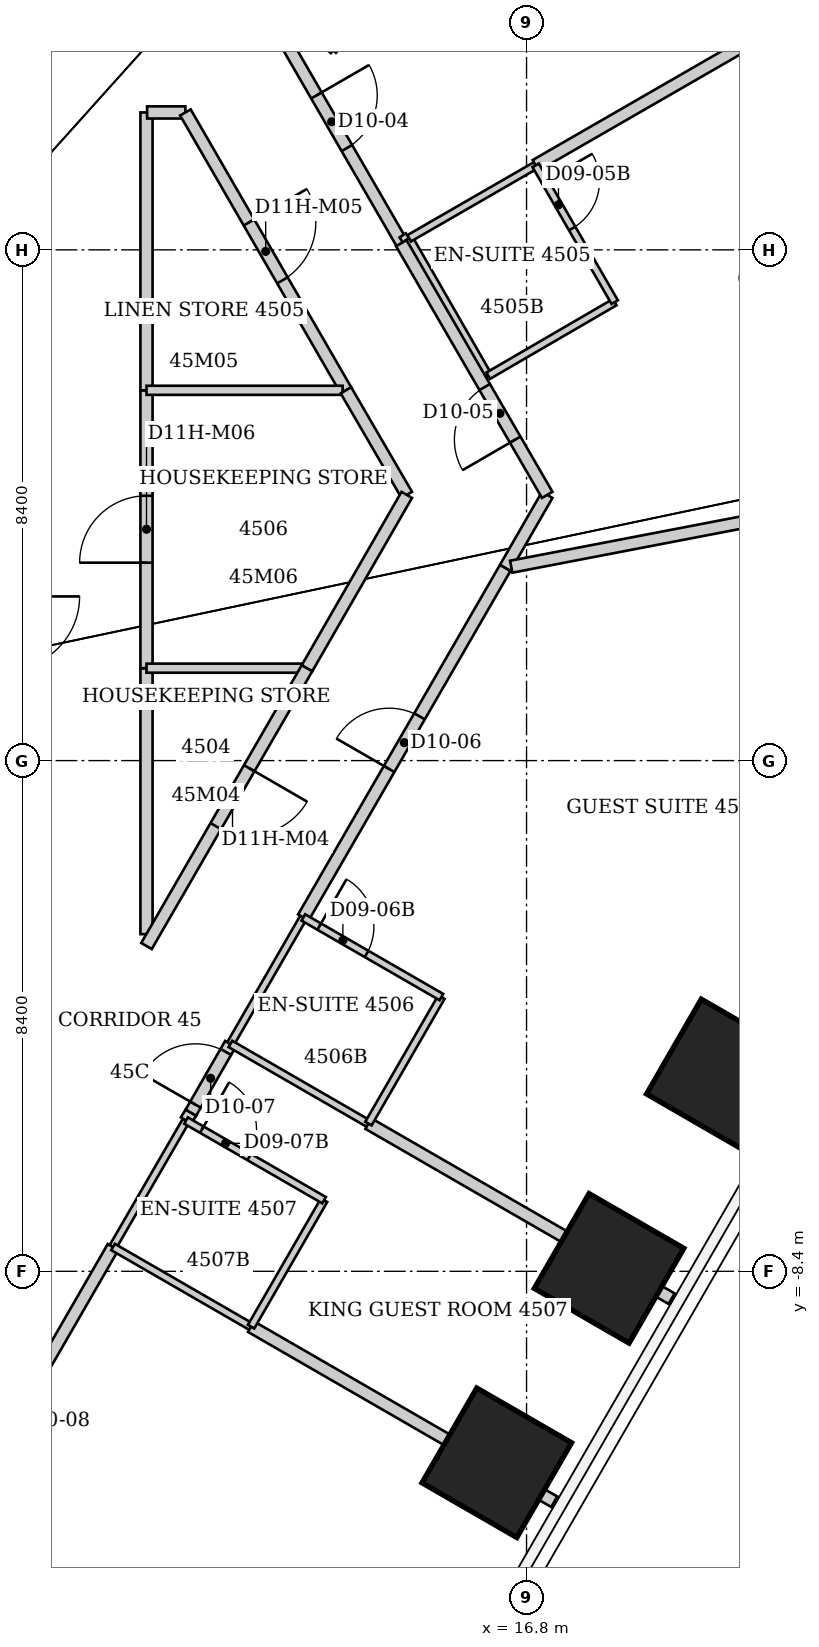
"""IFC4 building model, lengths in metres.
Left out: names, types, materials, properties, quantities, classifications, styles, units other than length and angle.
Written with IfcOpenShell. Run it as: python <this file> out.ifc"""

import sys

from ifc_helpers import new_model, si_unit, direction, frame, frame_2d, origin, origin_2d, place, context, subcontext, project, spatial, rectangle, extrude, element, fill, save


model = new_model("IFC4")
c1 = context("Model", 3, precision=1e-05, world=origin(), true_north=direction((0.0, 1.0)))
c2 = subcontext(c1, "Body", "Model", "MODEL_VIEW")
j1 = project(units=[si_unit("LENGTHUNIT", "METRE"), si_unit("PLANEANGLEUNIT", "RADIAN")], contexts=[c1])
p1 = place(None, origin())
s1 = spatial("IfcSite", under=j1, at=p1, CompositionType="ELEMENT")
p2 = place(p1, origin())
s2 = spatial("IfcBuilding", under=s1, at=p2, CompositionType="ELEMENT")
p3 = place(p2, frame((0.0, 0.0, 183.2)))
s3 = spatial("IfcBuildingStorey", under=s2, at=p3, CompositionType="ELEMENT", Elevation=183.2)
for number, where, z_axis, x_axis in (
    (1, (20.003, -5.153, 0.0), (0.0, 0.0, 1.0), (0.866, -0.5, 0.0)),
    (2, (18.157, -8.351, 0.0), (0.0, 0.0, 1.0), (0.866, -0.5, 0.0)),
    (3, (16.311, -11.549, 0.0), (0.0, 0.0, 1.0), (0.866, -0.5, 0.0)),
):
    element("IfcColumn", number, at=place(p3, frame(where, z_axis=z_axis, x_axis=x_axis)), inside=s3, PredefinedType="COLUMN", context=c2, shape_type="SweptSolid", body=[
        extrude(rectangle(XDim=1.8, YDim=1.8, at=origin_2d()), origin(), (0.0, 0.0, 1.0), 3.8),
    ])
p4 = place(p3, frame((6.7, -13.72, 0.0), z_axis=(0.0, 0.0, 1.0), x_axis=(0.499729921425, 0.866181277581, 0.0)))
e4 = element("IfcWall", 4, at=p4, inside=s3, PredefinedType="PARTITIONING", context=c2, shape_type="SweptSolid", body=[
    extrude(rectangle(XDim=6.604, YDim=0.2, at=frame_2d((3.302, 0.0))), origin(), (0.0, 0.0, 1.0), 3.64),
])
p5 = place(p4, frame((2.802, 0.0, 0.0)))
e5 = element("IfcOpeningElement", 5, at=p5, cuts=e4, PredefinedType="OPENING", context=c2, shape_type="SweptSolid", body=[
    extrude(rectangle(XDim=1.0, YDim=2.13, at=frame_2d((0.5, 1.065))), frame((0.0, 0.1, 0.0), z_axis=(0.0, -1.0, 0.0), x_axis=(1.0, 0.0, 0.0)), (0.0, 0.0, 1.0), 0.2),
])
p6 = place(p3, frame((9.996, -7.998, 0.0), z_axis=(0.0, 0.0, 1.0), x_axis=(0.501188543314, 0.865338109672, 0.0)))
e6 = element("IfcWall", 6, at=p6, inside=s3, PredefinedType="PARTITIONING", context=c2, shape_type="SweptSolid", body=[
    extrude(rectangle(XDim=2.402, YDim=0.12, at=frame_2d((1.201, 0.0))), origin(), (0.0, 0.0, 1.0), 3.64),
])
p7 = place(p3, frame((10.0, -8.0, 0.0), z_axis=(0.0, 0.0, 1.0), x_axis=(0.866010296064, -0.500026166427, 0.0)))
e7 = element("IfcWall", 7, at=p7, inside=s3, PredefinedType="PARTITIONING", context=c2, shape_type="SweptSolid", body=[
    extrude(rectangle(XDim=2.621, YDim=0.12, at=frame_2d((1.311, 0.0))), origin(), (0.0, 0.0, 1.0), 3.038),
])
p8 = place(p3, frame((10.55, -2.855, 0.0), z_axis=(0.0, 0.0, 1.0), x_axis=(0.0, 1.0, 0.0)))
e8 = element("IfcWall", 8, at=p8, inside=s3, PredefinedType="PARTITIONING", context=c2, shape_type="SweptSolid", body=[
    extrude(rectangle(XDim=4.375, YDim=0.2, at=frame_2d((2.188, 0.0))), origin(), (0.0, 0.0, 1.0), 3.64),
])
p9 = place(p3, frame((10.55, 1.52, 0.0), z_axis=(0.0, 0.0, 1.0), x_axis=(0.0, 1.0, 0.0)))
e9 = element("IfcWall", 9, at=p9, inside=s3, PredefinedType="PARTITIONING", context=c2, shape_type="SweptSolid", body=[
    extrude(rectangle(XDim=4.57, YDim=0.2, at=frame_2d((2.285, 0.0))), origin(), (0.0, 0.0, 1.0), 3.64),
])
p10 = place(p9, frame((1.735, 0.0, 0.0)))
e10 = element("IfcOpeningElement", 10, at=p10, cuts=e9, PredefinedType="OPENING", context=c2, shape_type="SweptSolid", body=[
    extrude(rectangle(XDim=1.1, YDim=2.2, at=frame_2d((0.55, 1.1))), frame((0.0, 0.1, 0.0), z_axis=(0.0, -1.0, 0.0), x_axis=(1.0, 0.0, 0.0)), (0.0, 0.0, 1.0), 0.2),
])
p11 = place(p3, frame((10.55, 1.52, 0.0), z_axis=(0.0, 0.0, 1.0), x_axis=(1.0, 0.0, 0.0)))
e11 = element("IfcWall", 11, at=p11, inside=s3, PredefinedType="PARTITIONING", context=c2, shape_type="SweptSolid", body=[
    extrude(rectangle(XDim=2.585, YDim=0.15, at=frame_2d((1.292, 0.0))), origin(), (0.0, 0.0, 1.0), 3.64),
])
p12 = place(p3, frame((10.55, 6.09, 0.0), z_axis=(0.0, 0.0, 1.0), x_axis=(0.0, 1.0, 0.0)))
e12 = element("IfcWall", 12, at=p12, inside=s3, PredefinedType="PARTITIONING", context=c2, shape_type="SweptSolid", body=[
    extrude(rectangle(XDim=4.57, YDim=0.2, at=frame_2d((2.285, 0.0))), origin(), (0.0, 0.0, 1.0), 3.64),
])
p13 = place(p3, frame((10.56, 10.66, 0.0), z_axis=(0.0, 0.0, 1.0), x_axis=(1.0, 0.0, 0.0)))
e13 = element("IfcWall", 13, at=p13, inside=s3, PredefinedType="PARTITIONING", context=c2, shape_type="SweptSolid", body=[
    extrude(rectangle(XDim=0.63, YDim=0.2, at=frame_2d((0.315, 0.0))), origin(), (0.0, 0.0, 1.0), 3.64),
])
p14 = place(p3, frame((11.19, 10.66, 0.0), z_axis=(0.0, 0.0, 1.0), x_axis=(0.500248310865, -0.865881993967, 0.0)))
e14 = element("IfcWall", 14, at=p14, inside=s3, PredefinedType="PARTITIONING", context=c2, shape_type="SweptSolid", body=[
    extrude(rectangle(XDim=5.278, YDim=0.2, at=frame_2d((2.639, 0.0))), origin(), (0.0, 0.0, 1.0), 3.64),
])
p15 = place(p14, frame((2.089, 0.0, 0.0)))
e15 = element("IfcOpeningElement", 15, at=p15, cuts=e14, PredefinedType="OPENING", context=c2, shape_type="SweptSolid", body=[
    extrude(rectangle(XDim=1.1, YDim=2.2, at=frame_2d((0.55, 1.1))), frame((0.0, 0.1, 0.0), z_axis=(0.0, -1.0, 0.0), x_axis=(1.0, 0.0, 0.0)), (0.0, 0.0, 1.0), 0.2),
])
p16 = place(p3, frame((11.2, -5.92, 0.0), z_axis=(0.0, 0.0, 1.0), x_axis=(0.524811420021, 0.851218522717, 0.0)))
e16 = element("IfcWall", 16, at=p16, inside=s3, PredefinedType="PARTITIONING", context=c2, shape_type="SweptSolid", body=[
    extrude(rectangle(XDim=0.153, YDim=0.2, at=frame_2d((0.076, 0.0))), origin(), (0.0, 0.0, 1.0), 3.64),
])
p17 = place(p3, frame((11.28, -5.79, 0.0), z_axis=(0.0, 0.0, 1.0), x_axis=(0.498516863914, 0.866880001149, 0.0)))
e17 = element("IfcWall", 17, at=p17, inside=s3, PredefinedType="PARTITIONING", context=c2, shape_type="SweptSolid", body=[
    extrude(rectangle(XDim=1.304, YDim=0.2, at=frame_2d((0.652, 0.0))), origin(), (0.0, 0.0, 1.0), 3.64),
])
p18 = place(p17, frame((0.152, 0.0, 0.0)))
e18 = element("IfcOpeningElement", 18, at=p18, cuts=e17, PredefinedType="OPENING", context=c2, shape_type="SweptSolid", body=[
    extrude(rectangle(XDim=1.0, YDim=2.13, at=frame_2d((0.5, 1.065))), frame((0.0, 0.1, 0.0), z_axis=(0.0, -1.0, 0.0), x_axis=(1.0, 0.0, 0.0)), (0.0, 0.0, 1.0), 0.2),
])
p19 = place(p3, frame((11.62, 13.42, 0.0), z_axis=(0.0, 0.0, 1.0), x_axis=(0.754444902764, -0.656363381591, 0.0)))
e19 = element("IfcWall", 19, at=p19, inside=s3, PredefinedType="PARTITIONING", context=c2, shape_type="SweptSolid", body=[
    extrude(rectangle(XDim=2.651, YDim=0.12, at=frame_2d((1.325, 0.0))), origin(), (0.0, 0.0, 1.0), 3.64),
])
p20 = place(p3, frame((11.93, -4.66, 0.0), z_axis=(0.0, 0.0, 1.0), x_axis=(0.499737123639, 0.866177122335, 0.0)))
e20 = element("IfcWall", 20, at=p20, inside=s3, PredefinedType="PARTITIONING", context=c2, shape_type="SweptSolid", body=[
    extrude(rectangle(XDim=2.401, YDim=0.12, at=frame_2d((1.201, 0.0))), origin(), (0.0, 0.0, 1.0), 3.64),
])
p21 = place(p3, frame((11.93, -4.66, 0.0), z_axis=(0.0, 0.0, 1.0), x_axis=(0.865969958829, -0.500096021185, 0.0)))
e21 = element("IfcWall", 21, at=p21, inside=s3, PredefinedType="PARTITIONING", context=c2, shape_type="SweptSolid", body=[
    extrude(rectangle(XDim=2.621, YDim=0.12, at=frame_2d((1.311, 0.0))), origin(), (0.0, 0.0, 1.0), 3.038),
])
p22 = place(p3, frame((12.27, -9.311, 0.0), z_axis=(0.0, 0.0, 1.0), x_axis=(0.865985044037, -0.500069898618, 0.0)))
e22 = element("IfcWall", 22, at=p22, inside=s3, PredefinedType="PARTITIONING", context=c2, shape_type="SweptSolid", body=[
    extrude(rectangle(XDim=5.758, YDim=0.2, at=frame_2d((2.879, 0.0))), origin(), (0.0, 0.0, 1.0), 3.038),
])
p23 = place(p3, frame((12.27, -9.31, 0.0), z_axis=(0.0, 0.0, 1.0), x_axis=(0.499693115345, 0.866202511239, 0.0)))
e23 = element("IfcWall", 23, at=p23, inside=s3, PredefinedType="PARTITIONING", context=c2, shape_type="SweptSolid", body=[
    extrude(rectangle(XDim=2.401, YDim=0.12, at=frame_2d((1.201, 0.0))), origin(), (0.0, 0.0, 1.0), 3.64),
])
p24 = place(p3, frame((12.44, 12.504, 0.0), z_axis=(0.0, 0.0, 1.0), x_axis=(0.500616963614, -0.865668906535, 0.0)))
e24 = element("IfcWall", 24, at=p24, inside=s3, PredefinedType="PARTITIONING", context=c2, shape_type="SweptSolid", body=[
    extrude(rectangle(XDim=4.614, YDim=0.2, at=frame_2d((2.307, 0.0))), origin(), (0.0, 0.0, 1.0), 3.64),
])
p25 = place(p24, frame((1.807, 0.0, 0.0)))
e25 = element("IfcOpeningElement", 25, at=p25, cuts=e24, PredefinedType="OPENING", context=c2, shape_type="SweptSolid", body=[
    extrude(rectangle(XDim=1.0, YDim=2.13, at=frame_2d((0.5, 1.065))), frame((0.0, 0.1, 0.0), z_axis=(0.0, -1.0, 0.0), x_axis=(1.0, 0.0, 0.0)), (0.0, 0.0, 1.0), 0.2),
])
p26 = place(p3, frame((13.13, -2.58, 0.0), z_axis=(0.0, 0.0, 1.0), x_axis=(0.500034373799, 0.866005557153, 0.0)))
e26 = element("IfcWall", 26, at=p26, inside=s3, PredefinedType="PARTITIONING", context=c2, shape_type="SweptSolid", body=[
    extrude(rectangle(XDim=6.64, YDim=0.2, at=frame_2d((3.32, 0.0))), origin(), (0.0, 0.0, 1.0), 3.64),
])
p27 = place(p26, frame((2.82, 0.0, 0.0)))
e27 = element("IfcOpeningElement", 27, at=p27, cuts=e26, PredefinedType="OPENING", context=c2, shape_type="SweptSolid", body=[
    extrude(rectangle(XDim=1.0, YDim=2.13, at=frame_2d((0.5, 1.065))), frame((0.0, 0.1, 0.0), z_axis=(0.0, -1.0, 0.0), x_axis=(1.0, 0.0, 0.0)), (0.0, 0.0, 1.0), 0.2),
])
p28 = place(p3, frame((13.19, 1.52, 0.0), z_axis=(0.0, 0.0, 1.0), x_axis=(-0.500193590286, -0.865913605527, 0.0)))
e28 = element("IfcWall", 28, at=p28, inside=s3, PredefinedType="PARTITIONING", context=c2, shape_type="SweptSolid", body=[
    extrude(rectangle(XDim=5.278, YDim=0.2, at=frame_2d((2.639, 0.0))), origin(), (0.0, 0.0, 1.0), 3.64),
])
p29 = place(p28, frame((1.9, 0.0, 0.0)))
e29 = element("IfcOpeningElement", 29, at=p29, cuts=e28, PredefinedType="OPENING", context=c2, shape_type="SweptSolid", body=[
    extrude(rectangle(XDim=1.1, YDim=2.2, at=frame_2d((0.55, 1.1))), frame((0.0, 0.1, 0.0), z_axis=(0.0, -1.0, 0.0), x_axis=(1.0, 0.0, 0.0)), (0.0, 0.0, 1.0), 0.2),
])
p30 = place(p3, frame((13.47, -7.23, 0.0), z_axis=(0.0, 0.0, 1.0), x_axis=(-0.866114241029, 0.499846097802, 0.0)))
e30 = element("IfcWall", 30, at=p30, inside=s3, PredefinedType="PARTITIONING", context=c2, shape_type="SweptSolid", body=[
    extrude(rectangle(XDim=2.621, YDim=0.12, at=frame_2d((1.311, 0.0))), origin(), (0.0, 0.0, 1.0), 3.64),
])
p31 = place(p30, frame((1.421, 0.0, 0.0)))
e31 = element("IfcOpeningElement", 31, at=p31, cuts=e30, PredefinedType="OPENING", context=c2, shape_type="SweptSolid", body=[
    extrude(rectangle(XDim=0.9, YDim=2.03, at=frame_2d((0.45, 1.015))), frame((0.0, 0.06, 0.0), z_axis=(0.0, -1.0, 0.0), x_axis=(1.0, 0.0, 0.0)), (0.0, 0.0, 1.0), 0.12),
])
p32 = place(p3, frame((13.62, 11.68, 0.0), z_axis=(0.0, 0.0, 1.0), x_axis=(0.655335308977, 0.755338091723, 0.0)))
e32 = element("IfcWall", 32, at=p32, inside=s3, PredefinedType="PARTITIONING", context=c2, shape_type="SweptSolid", body=[
    extrude(rectangle(XDim=2.502, YDim=0.12, at=frame_2d((1.251, 0.0))), origin(), (0.0, 0.0, 1.0), 3.64),
])
p33 = place(p3, frame((13.775, 6.09, 0.0), z_axis=(0.0, 0.0, 1.0), x_axis=(-1.0, 0.0, 0.0)))
e33 = element("IfcWall", 33, at=p33, inside=s3, PredefinedType="PARTITIONING", context=c2, shape_type="SweptSolid", body=[
    extrude(rectangle(XDim=3.225, YDim=0.15, at=frame_2d((1.612, 0.0))), origin(), (0.0, 0.0, 1.0), 3.64),
])
p34 = place(p3, frame((13.83, 6.09, 0.0), z_axis=(0.0, 0.0, 1.0), x_axis=(0.502573539539, -0.864534462792, 0.0)))
e34 = element("IfcWall", 34, at=p34, inside=s3, PredefinedType="PARTITIONING", context=c2, shape_type="SweptSolid", body=[
    extrude(rectangle(XDim=1.99, YDim=0.2, at=frame_2d((0.995, 0.0))), origin(), (0.0, 0.0, 1.0), 3.64),
])
p35 = place(p3, frame((14.2, -5.971, 0.0), z_axis=(0.0, 0.0, 1.0), x_axis=(0.86600340545, -0.500038100297, 0.0)))
e35 = element("IfcWall", 35, at=p35, inside=s3, PredefinedType="PARTITIONING", context=c2, shape_type="SweptSolid", body=[
    extrude(rectangle(XDim=5.758, YDim=0.2, at=frame_2d((2.879, 0.0))), origin(), (0.0, 0.0, 1.0), 3.038),
])
p36 = place(p3, frame((14.2, -5.97, 0.0), z_axis=(0.0, 0.0, 1.0), x_axis=(0.499737123639, 0.866177122335, 0.0)))
e36 = element("IfcWall", 36, at=p36, inside=s3, PredefinedType="PARTITIONING", context=c2, shape_type="SweptSolid", body=[
    extrude(rectangle(XDim=2.401, YDim=0.12, at=frame_2d((1.201, 0.0))), origin(), (0.0, 0.0, 1.0), 3.64),
])
p37 = place(p3, frame((14.767, 8.521, 0.0), z_axis=(0.0, 0.0, 1.0), x_axis=(0.831142316784, 0.55605975331, 0.0)))
e37 = element("IfcWall", 37, at=p37, inside=s3, PredefinedType="PARTITIONING", context=c2, shape_type="SweptSolid", body=[
    extrude(rectangle(XDim=0.124, YDim=0.2, at=frame_2d((0.062, 0.0))), origin(), (0.0, 0.0, 1.0), 3.64),
])
p38 = place(p3, frame((14.83, 4.37, 0.0), z_axis=(0.0, 0.0, 1.0), x_axis=(-0.498775186059, -0.866731396554, 0.0)))
e38 = element("IfcWall", 38, at=p38, inside=s3, PredefinedType="PARTITIONING", context=c2, shape_type="SweptSolid", body=[
    extrude(rectangle(XDim=3.288, YDim=0.2, at=frame_2d((1.644, 0.0))), origin(), (0.0, 0.0, 1.0), 3.64),
])
p39 = place(p3, frame((14.87, 8.59, 0.0), z_axis=(0.0, 0.0, 1.0), x_axis=(0.498557331759, -0.866856728041, 0.0)))
e39 = element("IfcWall", 39, at=p39, inside=s3, PredefinedType="PARTITIONING", context=c2, shape_type="SweptSolid", body=[
    extrude(rectangle(XDim=2.607, YDim=0.12, at=frame_2d((1.304, 0.0))), origin(), (0.0, 0.0, 1.0), 3.64),
])
p40 = place(p3, frame((14.87, 8.59, 0.0), z_axis=(0.0, 0.0, 1.0), x_axis=(0.866177122335, 0.499737123639, 0.0)))
e40 = element("IfcWall", 40, at=p40, inside=s3, PredefinedType="PARTITIONING", context=c2, shape_type="SweptSolid", body=[
    extrude(rectangle(XDim=2.401, YDim=0.12, at=frame_2d((1.201, 0.0))), origin(), (0.0, 0.0, 1.0), 2.878),
])
p41 = place(p3, frame((15.4, -3.89, 0.0), z_axis=(0.0, 0.0, 1.0), x_axis=(-0.866154567199, 0.49977621564, 0.0)))
e41 = element("IfcWall", 41, at=p41, inside=s3, PredefinedType="PARTITIONING", context=c2, shape_type="SweptSolid", body=[
    extrude(rectangle(XDim=2.621, YDim=0.12, at=frame_2d((1.311, 0.0))), origin(), (0.0, 0.0, 1.0), 3.64),
])
p42 = place(p41, frame((1.421, 0.0, 0.0)))
e42 = element("IfcOpeningElement", 42, at=p42, cuts=e41, PredefinedType="OPENING", context=c2, shape_type="SweptSolid", body=[
    extrude(rectangle(XDim=0.9, YDim=2.03, at=frame_2d((0.45, 1.015))), frame((0.0, 0.06, 0.0), z_axis=(0.0, -1.0, 0.0), x_axis=(1.0, 0.0, 0.0)), (0.0, 0.0, 1.0), 0.12),
])
p43 = place(p3, frame((16.17, 6.33, 0.0), z_axis=(0.0, 0.0, 1.0), x_axis=(0.864396442809, 0.502810888564, 0.0)))
e43 = element("IfcWall", 43, at=p43, inside=s3, PredefinedType="PARTITIONING", context=c2, shape_type="SweptSolid", body=[
    extrude(rectangle(XDim=2.406, YDim=0.12, at=frame_2d((1.203, 0.0))), origin(), (0.0, 0.0, 1.0), 3.64),
])
p44 = place(p3, frame((16.45, 3.17, 0.0), z_axis=(0.0, 0.0, 1.0), x_axis=(0.49845455473, 0.866915830325, 0.0)))
e44 = element("IfcWall", 44, at=p44, inside=s3, PredefinedType="PARTITIONING", context=c2, shape_type="SweptSolid", body=[
    extrude(rectangle(XDim=1.384, YDim=0.2, at=frame_2d((0.692, 0.0))), origin(), (0.0, 0.0, 1.0), 3.64),
])
p45 = place(p3, frame((16.95, 9.79, 0.0), z_axis=(0.0, 0.0, 1.0), x_axis=(0.866371236465, 0.499400521251, 0.0)))
e45 = element("IfcWall", 45, at=p45, inside=s3, PredefinedType="PARTITIONING", context=c2, shape_type="SweptSolid", body=[
    extrude(rectangle(XDim=6.829, YDim=0.2, at=frame_2d((3.414, 0.0))), origin(), (0.0, 0.0, 1.0), 2.878),
])
p46 = place(p3, frame((17.14, 4.37, 0.0), z_axis=(0.0, 0.0, 1.0), x_axis=(-0.501524901322, 0.865143209737, 0.0)))
e46 = element("IfcWall", 46, at=p46, inside=s3, PredefinedType="PARTITIONING", context=c2, shape_type="SweptSolid", body=[
    extrude(rectangle(XDim=4.785, YDim=0.2, at=frame_2d((2.393, 0.0))), origin(), (0.0, 0.0, 1.0), 3.64),
])
p47 = place(p46, frame((1.05, 0.0, 0.0)))
e47 = element("IfcOpeningElement", 47, at=p47, cuts=e46, PredefinedType="OPENING", context=c2, shape_type="SweptSolid", body=[
    extrude(rectangle(XDim=1.0, YDim=2.13, at=frame_2d((0.5, 1.065))), frame((0.0, 0.1, 0.0), z_axis=(0.0, -1.0, 0.0), x_axis=(1.0, 0.0, 0.0)), (0.0, 0.0, 1.0), 0.2),
])
p48 = place(p3, frame((18.25, 7.54, 0.0), z_axis=(0.0, 0.0, 1.0), x_axis=(-0.500291685314, 0.865856933682, 0.0)))
e48 = element("IfcWall", 48, at=p48, inside=s3, PredefinedType="PARTITIONING", context=c2, shape_type="SweptSolid", body=[
    extrude(rectangle(XDim=2.599, YDim=0.12, at=frame_2d((1.299, 0.0))), origin(), (0.0, 0.0, 1.0), 3.64),
])
p49 = place(p48, frame((1.399, 0.0, 0.0)))
e49 = element("IfcOpeningElement", 49, at=p49, cuts=e48, PredefinedType="OPENING", context=c2, shape_type="SweptSolid", body=[
    extrude(rectangle(XDim=0.9, YDim=2.03, at=frame_2d((0.45, 1.015))), frame((0.0, 0.06, 0.0), z_axis=(0.0, -1.0, 0.0), x_axis=(1.0, 0.0, 0.0)), (0.0, 0.0, 1.0), 0.12),
])
p50 = place(p3, frame((27.041, 5.204, 0.0), z_axis=(0.0, 0.0, 1.0), x_axis=(-0.982047984466, -0.188631270488, 0.0)))
e50 = element("IfcWall", 50, at=p50, inside=s3, PredefinedType="PARTITIONING", context=c2, shape_type="SweptSolid", body=[
    extrude(rectangle(XDim=10.684, YDim=0.2, at=frame_2d((5.342, 0.0))), origin(), (0.0, 0.0, 1.0), 3.64),
])
p51 = place(p25, origin())
e51 = element("IfcDoor", 51, at=p51, inside=s3, OperationType="SINGLE_SWING_LEFT", PredefinedType="DOOR", context=c2, shape_type="SweptSolid", body=[
    extrude(rectangle(XDim=1.0, YDim=2.13, at=frame_2d((0.5, 1.065))), frame((0.0, 0.025, 0.0), z_axis=(0.0, -1.0, 0.0), x_axis=(1.0, 0.0, 0.0)), (0.0, 0.0, 1.0), 0.05),
])
fill(e25, e51)
p52 = place(p47, origin())
e52 = element("IfcDoor", 52, at=p52, inside=s3, OperationType="SINGLE_SWING_LEFT", PredefinedType="DOOR", context=c2, shape_type="SweptSolid", body=[
    extrude(rectangle(XDim=1.0, YDim=2.13, at=frame_2d((0.5, 1.065))), frame((0.0, 0.025, 0.0), z_axis=(0.0, -1.0, 0.0), x_axis=(1.0, 0.0, 0.0)), (0.0, 0.0, 1.0), 0.05),
])
fill(e47, e52)
p53 = place(p49, origin())
e53 = element("IfcDoor", 53, at=p53, inside=s3, OperationType="SINGLE_SWING_RIGHT", PredefinedType="DOOR", context=c2, shape_type="SweptSolid", body=[
    extrude(rectangle(XDim=0.9, YDim=2.03, at=frame_2d((0.45, 1.015))), frame((0.0, 0.025, 0.0), z_axis=(0.0, -1.0, 0.0), x_axis=(1.0, 0.0, 0.0)), (0.0, 0.0, 1.0), 0.05),
])
fill(e49, e53)
p54 = place(p27, origin())
e54 = element("IfcDoor", 54, at=p54, inside=s3, OperationType="SINGLE_SWING_LEFT", PredefinedType="DOOR", context=c2, shape_type="SweptSolid", body=[
    extrude(rectangle(XDim=1.0, YDim=2.13, at=frame_2d((0.5, 1.065))), frame((0.0, 0.025, 0.0), z_axis=(0.0, -1.0, 0.0), x_axis=(1.0, 0.0, 0.0)), (0.0, 0.0, 1.0), 0.05),
])
fill(e27, e54)
p55 = place(p42, origin())
e55 = element("IfcDoor", 55, at=p55, inside=s3, OperationType="SINGLE_SWING_RIGHT", PredefinedType="DOOR", context=c2, shape_type="SweptSolid", body=[
    extrude(rectangle(XDim=0.9, YDim=2.03, at=frame_2d((0.45, 1.015))), frame((0.0, 0.025, 0.0), z_axis=(0.0, -1.0, 0.0), x_axis=(1.0, 0.0, 0.0)), (0.0, 0.0, 1.0), 0.05),
])
fill(e42, e55)
p56 = place(p18, origin())
e56 = element("IfcDoor", 56, at=p56, inside=s3, OperationType="SINGLE_SWING_LEFT", PredefinedType="DOOR", context=c2, shape_type="SweptSolid", body=[
    extrude(rectangle(XDim=1.0, YDim=2.13, at=frame_2d((0.5, 1.065))), frame((0.0, 0.025, 0.0), z_axis=(0.0, -1.0, 0.0), x_axis=(1.0, 0.0, 0.0)), (0.0, 0.0, 1.0), 0.05),
])
fill(e18, e56)
p57 = place(p31, origin())
e57 = element("IfcDoor", 57, at=p57, inside=s3, OperationType="SINGLE_SWING_RIGHT", PredefinedType="DOOR", context=c2, shape_type="SweptSolid", body=[
    extrude(rectangle(XDim=0.9, YDim=2.03, at=frame_2d((0.45, 1.015))), frame((0.0, 0.025, 0.0), z_axis=(0.0, -1.0, 0.0), x_axis=(1.0, 0.0, 0.0)), (0.0, 0.0, 1.0), 0.05),
])
fill(e31, e57)
p58 = place(p29, origin())
e58 = element("IfcDoor", 58, at=p58, inside=s3, OperationType="SINGLE_SWING_LEFT", PredefinedType="DOOR", context=c2, shape_type="SweptSolid", body=[
    extrude(rectangle(XDim=1.1, YDim=2.2, at=frame_2d((0.55, 1.1))), frame((0.0, 0.025, 0.0), z_axis=(0.0, -1.0, 0.0), x_axis=(1.0, 0.0, 0.0)), (0.0, 0.0, 1.0), 0.05),
])
fill(e29, e58)
p59 = place(p15, origin())
e59 = element("IfcDoor", 59, at=p59, inside=s3, OperationType="SINGLE_SWING_LEFT", PredefinedType="DOOR", context=c2, shape_type="SweptSolid", body=[
    extrude(rectangle(XDim=1.1, YDim=2.2, at=frame_2d((0.55, 1.1))), frame((0.0, 0.025, 0.0), z_axis=(0.0, -1.0, 0.0), x_axis=(1.0, 0.0, 0.0)), (0.0, 0.0, 1.0), 0.05),
])
fill(e15, e59)
p60 = place(p10, origin())
e60 = element("IfcDoor", 60, at=p60, inside=s3, OperationType="SINGLE_SWING_LEFT", PredefinedType="DOOR", context=c2, shape_type="SweptSolid", body=[
    extrude(rectangle(XDim=1.1, YDim=2.2, at=frame_2d((0.55, 1.1))), frame((0.0, 0.025, 0.0), z_axis=(0.0, -1.0, 0.0), x_axis=(1.0, 0.0, 0.0)), (0.0, 0.0, 1.0), 0.05),
])
fill(e10, e60)
save(model, sys.argv[1])
